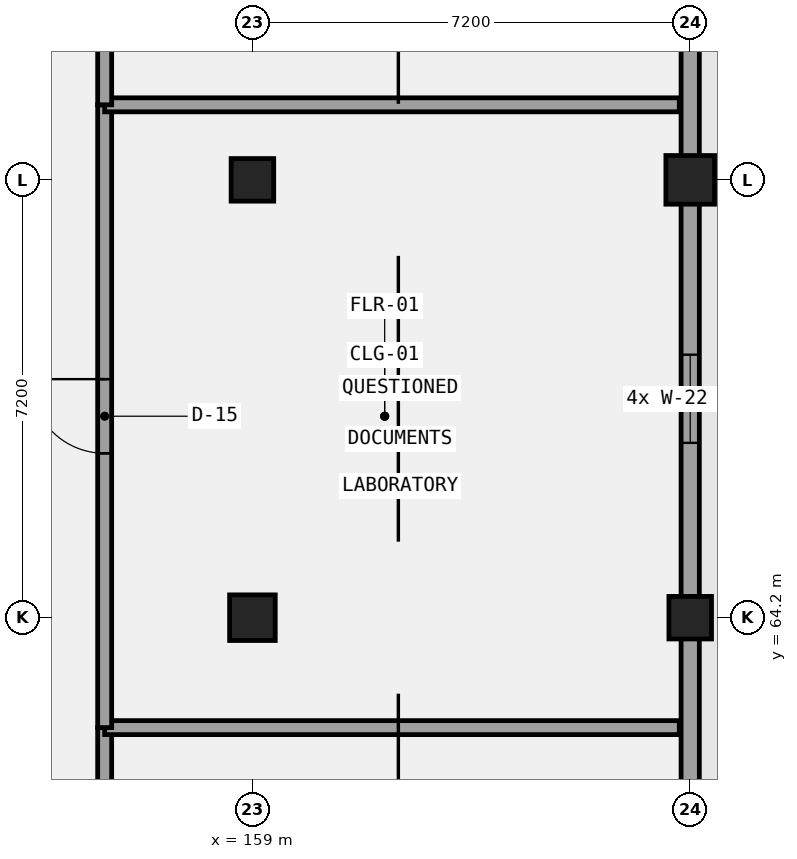
"""IFC4 building model, lengths in metres.
Left out: names, types, materials, properties, quantities, classifications, styles, units other than length and angle.
Written with IfcOpenShell. Run it as: python <this file> out.ifc"""

import sys

from ifc_helpers import new_model, si_unit, direction, frame, frame_2d, origin, origin_2d, place, context, subcontext, project, spatial, rectangle, extrude, element, fill, save


model = new_model("IFC4")
c1 = context("Model", 3, precision=1e-05, world=origin(), true_north=direction((0.0, 1.0)))
c2 = subcontext(c1, "Body", "Model", "MODEL_VIEW")
j1 = project(units=[si_unit("LENGTHUNIT", "METRE"), si_unit("PLANEANGLEUNIT", "RADIAN")], contexts=[c1])
p1 = place(None, origin())
s1 = spatial("IfcSite", under=j1, at=p1, CompositionType="ELEMENT")
p2 = place(p1, origin())
s2 = spatial("IfcBuilding", under=s1, at=p2, CompositionType="ELEMENT")
p3 = place(p2, frame((0.0, 0.0, 5.4)))
s3 = spatial("IfcBuildingStorey", under=s2, at=p3, CompositionType="ELEMENT", Elevation=5.4)
p4 = place(p3, frame((159.0, 64.2, 0.0), z_axis=(0.0, 0.0, 1.0), x_axis=(1.0, 0.0, 0.0)))
e1 = element("IfcColumn", 1, at=p4, inside=s3, PredefinedType="COLUMN", context=c2, shape_type="SweptSolid", body=[
    extrude(rectangle(XDim=0.75, YDim=0.75, at=origin_2d()), origin(), (0.0, 0.0, 1.0), 4.2),
])
for number, where, z_axis, x_axis in (
    (2, (159.0, 71.4, 0.0), (0.0, 0.0, 1.0), (1.0, 0.0, 0.0)),
    (3, (166.2, 64.2, 0.0), (0.0, 0.0, 1.0), (1.0, 0.0, 0.0)),
):
    element("IfcColumn", number, at=place(p3, frame(where, z_axis=z_axis, x_axis=x_axis)), inside=s3, PredefinedType="COLUMN", context=c2, shape_type="SweptSolid", body=[
        extrude(rectangle(XDim=0.7, YDim=0.7, at=origin_2d()), origin(), (0.0, 0.0, 1.0), 4.2),
    ])
p5 = place(p3, frame((166.2, 71.4, 0.0), z_axis=(0.0, 0.0, 1.0), x_axis=(1.0, 0.0, 0.0)))
e4 = element("IfcColumn", 4, at=p5, inside=s3, PredefinedType="COLUMN", context=c2, shape_type="SweptSolid", body=[
    extrude(rectangle(XDim=0.8, YDim=0.8, at=origin_2d()), origin(), (0.0, 0.0, 1.0), 4.2),
])
p6 = place(p3, frame((166.2, 50.05, 0.0), z_axis=(0.0, 0.0, 1.0), x_axis=(0.0, 1.0, 0.0)))
e5 = element("IfcWall", 5, at=p6, inside=s3, PredefinedType="SOLIDWALL", context=c2, shape_type="SweptSolid", body=[
    extrude(rectangle(XDim=28.4, YDim=0.3, at=frame_2d((14.2, 0.0))), origin(), (0.0, 0.0, 1.0), 3.17),
])
p7 = place(p6, frame((2.75, 0.0, 1.0)))
e6 = element("IfcOpeningElement", 6, at=p7, cuts=e5, PredefinedType="OPENING", context=c2, shape_type="SweptSolid", body=[
    extrude(rectangle(XDim=1.45, YDim=1.65, at=frame_2d((0.725, 0.825))), frame((0.0, 0.16, 0.0), z_axis=(0.0, -1.0, 0.0), x_axis=(1.0, 0.0, 0.0)), (0.0, 0.0, 1.0), 0.32),
])
p8 = place(p6, frame((9.825, 0.0, 1.0)))
e7 = element("IfcOpeningElement", 7, at=p8, cuts=e5, PredefinedType="OPENING", context=c2, shape_type="SweptSolid", body=[
    extrude(rectangle(XDim=1.45, YDim=1.65, at=frame_2d((0.725, 0.825))), frame((0.0, 0.16, 0.0), z_axis=(0.0, -1.0, 0.0), x_axis=(1.0, 0.0, 0.0)), (0.0, 0.0, 1.0), 0.32),
])
p9 = place(p6, frame((17.025, 0.0, 1.0)))
e8 = element("IfcOpeningElement", 8, at=p9, cuts=e5, PredefinedType="OPENING", context=c2, shape_type="SweptSolid", body=[
    extrude(rectangle(XDim=1.45, YDim=1.65, at=frame_2d((0.725, 0.825))), frame((0.0, 0.16, 0.0), z_axis=(0.0, -1.0, 0.0), x_axis=(1.0, 0.0, 0.0)), (0.0, 0.0, 1.0), 0.32),
])
p10 = place(p6, frame((24.15, 0.0, 1.0)))
e9 = element("IfcOpeningElement", 9, at=p10, cuts=e5, PredefinedType="OPENING", context=c2, shape_type="SweptSolid", body=[
    extrude(rectangle(XDim=1.45, YDim=1.65, at=frame_2d((0.725, 0.825))), frame((0.0, 0.16, 0.0), z_axis=(0.0, -1.0, 0.0), x_axis=(1.0, 0.0, 0.0)), (0.0, 0.0, 1.0), 0.32),
])
p11 = place(p3, frame((156.57, 55.996, 0.0), z_axis=(0.0, 0.0, 1.0), x_axis=(0.0, 1.0, 0.0)))
e10 = element("IfcWall", 10, at=p11, inside=s3, PredefinedType="PARTITIONING", context=c2, shape_type="SweptSolid", body=[
    extrude(rectangle(XDim=6.396, YDim=0.23, at=frame_2d((3.198, 0.0))), origin(), (0.0, 0.0, 1.0), 3.92),
])
p12 = place(p11, frame((2.588, 0.0, 0.0)))
e11 = element("IfcOpeningElement", 11, at=p12, cuts=e10, PredefinedType="OPENING", context=c2, shape_type="SweptSolid", body=[
    extrude(rectangle(XDim=1.22, YDim=2.22, at=frame_2d((0.61, 1.11))), frame((0.0, 0.125, 0.0), z_axis=(0.0, -1.0, 0.0), x_axis=(1.0, 0.0, 0.0)), (0.0, 0.0, 1.0), 0.25),
])
p13 = place(p3, frame((156.57, 62.392, 0.0), z_axis=(0.0, 0.0, 1.0), x_axis=(1.0, 0.0, 0.0)))
e12 = element("IfcWall", 12, at=p13, inside=s3, PredefinedType="PARTITIONING", context=c2, shape_type="SweptSolid", body=[
    extrude(rectangle(XDim=9.45, YDim=0.23, at=frame_2d((4.725, 0.0))), origin(), (0.0, 0.0, 1.0), 3.37),
])
p14 = place(p3, frame((156.57, 62.392, 0.0), z_axis=(0.0, 0.0, 1.0), x_axis=(0.0, 1.0, 0.0)))
e13 = element("IfcWall", 13, at=p14, inside=s3, PredefinedType="PARTITIONING", context=c2, shape_type="SweptSolid", body=[
    extrude(rectangle(XDim=10.242, YDim=0.23, at=frame_2d((5.121, 0.0))), origin(), (0.0, 0.0, 1.0), 3.92),
])
p15 = place(p14, frame((4.511, 0.0, 0.0)))
e14 = element("IfcOpeningElement", 14, at=p15, cuts=e13, PredefinedType="OPENING", context=c2, shape_type="SweptSolid", body=[
    extrude(rectangle(XDim=1.22, YDim=2.35, at=frame_2d((0.61, 1.175))), frame((0.0, 0.125, 0.0), z_axis=(0.0, -1.0, 0.0), x_axis=(1.0, 0.0, 0.0)), (0.0, 0.0, 1.0), 0.25),
])
p16 = place(p3, frame((156.57, 72.634, 0.0), z_axis=(0.0, 0.0, 1.0), x_axis=(1.0, 0.0, 0.0)))
e15 = element("IfcWall", 15, at=p16, inside=s3, PredefinedType="PARTITIONING", context=c2, shape_type="SweptSolid", body=[
    extrude(rectangle(XDim=9.45, YDim=0.23, at=frame_2d((4.725, 0.0))), origin(), (0.0, 0.0, 1.0), 3.92),
])
p17 = place(p3, frame((156.57, 72.634, 0.0), z_axis=(0.0, 0.0, 1.0), x_axis=(0.0, 1.0, 0.0)))
e16 = element("IfcWall", 16, at=p17, inside=s3, PredefinedType="PARTITIONING", context=c2, shape_type="SweptSolid", body=[
    extrude(rectangle(XDim=5.546, YDim=0.23, at=frame_2d((2.773, 0.0))), origin(), (0.0, 0.0, 1.0), 3.92),
])
p18 = place(p17, frame((2.093, 0.0, 0.0)))
e17 = element("IfcOpeningElement", 17, at=p18, cuts=e16, PredefinedType="OPENING", context=c2, shape_type="SweptSolid", body=[
    extrude(rectangle(XDim=1.36, YDim=2.1, at=frame_2d((0.68, 1.05))), frame((0.0, 0.125, 0.0), z_axis=(0.0, -1.0, 0.0), x_axis=(1.0, 0.0, 0.0)), (0.0, 0.0, 1.0), 0.25),
])
p19 = place(p9, origin())
e18 = element("IfcWindow", 18, at=p19, inside=s3, PartitioningType="SINGLE_PANEL", PredefinedType="WINDOW", context=c2, shape_type="SweptSolid", body=[
    extrude(rectangle(XDim=1.45, YDim=1.65, at=frame_2d((0.725, 0.825))), frame((0.0, 0.03, 0.0), z_axis=(0.0, -1.0, 0.0), x_axis=(1.0, 0.0, 0.0)), (0.0, 0.0, 1.0), 0.06),
])
fill(e8, e18)
p20 = place(p15, origin())
e19 = element("IfcDoor", 19, at=p20, inside=s3, OperationType="SINGLE_SWING_RIGHT", PredefinedType="DOOR", context=c2, shape_type="SweptSolid", body=[
    extrude(rectangle(XDim=1.22, YDim=2.35, at=frame_2d((0.61, 1.175))), frame((0.0, 0.025, 0.0), z_axis=(0.0, -1.0, 0.0), x_axis=(1.0, 0.0, 0.0)), (0.0, 0.0, 1.0), 0.05),
])
fill(e14, e19)
save(model, sys.argv[1])
